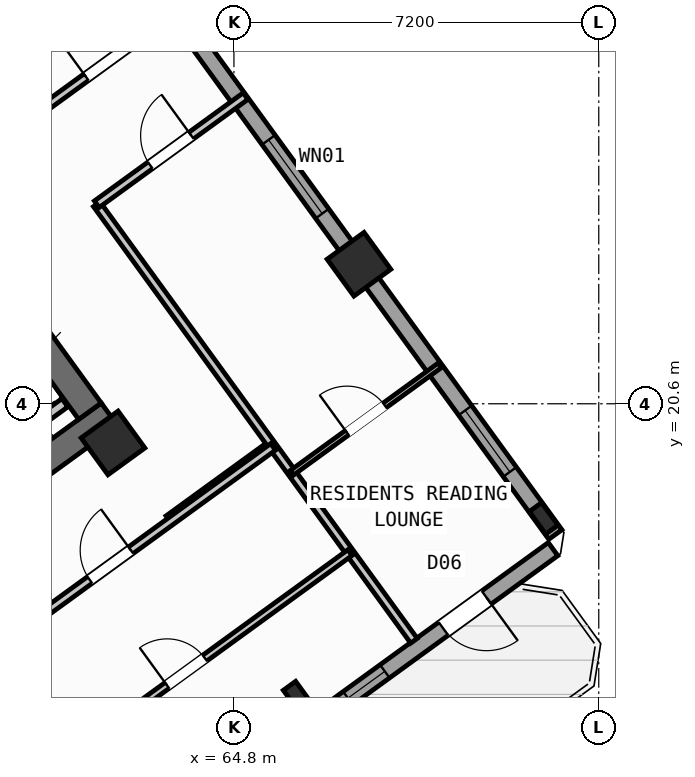
"""IFC4 building model, lengths in metres.
Left out: names, types, materials, properties, quantities, classifications, styles, units other than length and angle.
Written with IfcOpenShell. Run it as: python <this file> out.ifc"""

import sys

from ifc_helpers import new_model, si_unit, direction, frame, frame_2d, origin, origin_2d, place, context, subcontext, project, spatial, rectangle, hollow_rectangle, i_section, extrude, source, transform, mapped, element, fill, save


model = new_model("IFC4")
c1 = context("Model", 3, precision=1e-05, world=origin(), true_north=direction((0.0, 1.0)))
c2 = subcontext(c1, "Body", "Model", "MODEL_VIEW")
j1 = project(units=[si_unit("LENGTHUNIT", "METRE"), si_unit("PLANEANGLEUNIT", "RADIAN")], contexts=[c1])
p1 = place(None, origin())
s1 = spatial("IfcSite", under=j1, at=p1, CompositionType="ELEMENT")
p2 = place(p1, origin())
s2 = spatial("IfcBuilding", under=s1, at=p2, CompositionType="ELEMENT")
p3 = place(p2, frame((0.0, 0.0, 144.3)))
s3 = spatial("IfcBuildingStorey", under=s2, at=p3, CompositionType="ELEMENT", Elevation=144.3)
p4 = place(p3, frame((52.359, 13.14, 0.0), z_axis=(0.0, 0.0, 1.0), x_axis=(0.809014896919, 0.587788139183, 0.0)))
e1 = element("IfcWall", 1, at=p4, inside=s3, PredefinedType="SHEAR", context=c2, shape_type="SweptSolid", body=[
    extrude(rectangle(XDim=12.34, YDim=0.55, at=frame_2d((6.17, 0.0))), origin(), (0.0, 0.0, 1.0), 3.35),
])
p5 = place(p3, frame((61.958, 20.454, 0.0), z_axis=(0.0, 0.0, 1.0), x_axis=(-0.587802113096, 0.809004744015, 0.0)))
e2 = element("IfcWall", 2, at=p5, inside=s3, PredefinedType="SHEAR", context=c2, shape_type="SweptSolid", body=[
    extrude(rectangle(XDim=3.575, YDim=0.55, at=frame_2d((1.788, 0.0))), origin(), (0.0, 0.0, 1.0), 3.35),
])
m1 = source(origin(), c2, "Body", "SweptSolid", [
    extrude(i_section(OverallWidth=0.3, OverallDepth=0.55, WebThickness=0.015, FlangeThickness=0.029, at=origin_2d()), origin(), (0.0, 0.0, 1.0), 3.6),
])
p6 = place(p3, frame((66.058, 14.811, 0.0), z_axis=(0.0, 0.0, 1.0), x_axis=(0.809016994375, 0.587785252292, 0.0)))
e3 = element("IfcColumn", 3, at=p6, inside=s3, PredefinedType="COLUMN", context=c2, shape_type="MappedRepresentation", body=[
    mapped(m1, transform((0.0, 0.0, 0.0), scale=1.0)),
])
m2 = source(origin(), c2, "Body", "SweptSolid", [
    extrude(hollow_rectangle(XDim=0.9, YDim=0.9, WallThickness=0.036, at=origin_2d()), origin(), (0.0, 0.0, 1.0), 3.6),
])
p7 = place(p3, frame((62.414, 19.827, 0.0), z_axis=(0.0, 0.0, 1.0), x_axis=(0.809016994375, 0.587785252292, 0.0)))
e4 = element("IfcColumn", 4, at=p7, inside=s3, PredefinedType="COLUMN", context=c2, shape_type="MappedRepresentation", body=[
    mapped(m2, transform((0.0, 0.0, 0.0), scale=1.0)),
])
p8 = place(p3, frame((70.912, 18.338, 0.0), z_axis=(0.0, 0.0, 1.0), x_axis=(0.809016994375, 0.587785252292, 0.0)))
e5 = element("IfcColumn", 5, at=p8, inside=s3, PredefinedType="COLUMN", context=c2, shape_type="MappedRepresentation", body=[
    mapped(m1, transform((0.0, 0.0, 0.0), scale=1.0)),
])
p9 = place(p3, frame((67.268, 23.354, 0.0), z_axis=(0.0, 0.0, 1.0), x_axis=(0.809016994375, 0.587785252292, 0.0)))
e6 = element("IfcColumn", 6, at=p9, inside=s3, PredefinedType="COLUMN", context=c2, shape_type="MappedRepresentation", body=[
    mapped(m2, transform((0.0, 0.0, 0.0), scale=1.0)),
])
p10 = place(p3, frame((58.455, 35.484, 0.0), z_axis=(0.0, 0.0, 1.0), x_axis=(0.587783625747, -0.809018176127, 0.0)))
e7 = element("IfcWall", 7, at=p10, inside=s3, PredefinedType="STANDARD", context=c2, shape_type="SweptSolid", body=[
    extrude(rectangle(XDim=21.587, YDim=0.32, at=frame_2d((10.794, 0.0))), origin(), (0.0, 0.0, 1.0), 2.775),
])
p11 = place(p10, frame((2.994, 0.0, 0.8)))
e8 = element("IfcOpeningElement", 8, at=p11, cuts=e7, PredefinedType="OPENING", context=c2, shape_type="SweptSolid", body=[
    extrude(rectangle(XDim=2.1, YDim=1.55, at=frame_2d((1.05, 0.775))), frame((0.0, 0.17, 0.0), z_axis=(0.0, -1.0, 0.0), x_axis=(1.0, 0.0, 0.0)), (0.0, 0.0, 1.0), 0.34),
])
p12 = place(p10, frame((11.959, 0.0, 0.85)))
e9 = element("IfcOpeningElement", 9, at=p12, cuts=e7, PredefinedType="OPENING", context=c2, shape_type="SweptSolid", body=[
    extrude(rectangle(XDim=1.8, YDim=1.5, at=frame_2d((0.9, 0.75))), frame((0.0, 0.17, 0.0), z_axis=(0.0, -1.0, 0.0), x_axis=(1.0, 0.0, 0.0)), (0.0, 0.0, 1.0), 0.34),
])
p13 = place(p10, frame((18.56, 0.0, 0.85)))
e10 = element("IfcOpeningElement", 10, at=p13, cuts=e7, PredefinedType="OPENING", context=c2, shape_type="SweptSolid", body=[
    extrude(rectangle(XDim=1.5, YDim=1.5, at=frame_2d((0.75, 0.75))), frame((0.0, 0.17, 0.0), z_axis=(0.0, -1.0, 0.0), x_axis=(1.0, 0.0, 0.0)), (0.0, 0.0, 1.0), 0.34),
])
p14 = place(p3, frame((71.098, 17.731, 0.0), z_axis=(0.0, 0.0, 1.0), x_axis=(-0.809021120468, -0.587779573171, 0.0)))
e11 = element("IfcWall", 11, at=p14, inside=s3, PredefinedType="STANDARD", context=c2, shape_type="SweptSolid", body=[
    extrude(rectangle(XDim=17.588, YDim=0.32, at=frame_2d((8.794, 0.0))), origin(), (0.0, 0.0, 1.0), 3.35),
])
p15 = place(p14, frame((1.624, 0.0, 0.0)))
e12 = element("IfcOpeningElement", 12, at=p15, cuts=e11, PredefinedType="OPENING", context=c2, shape_type="SweptSolid", body=[
    extrude(rectangle(XDim=1.05, YDim=2.15, at=frame_2d((0.525, 1.075))), frame((0.0, 0.17, 0.0), z_axis=(0.0, -1.0, 0.0), x_axis=(1.0, 0.0, 0.0)), (0.0, 0.0, 1.0), 0.34),
])
p16 = place(p14, frame((4.104, 0.0, 1.0)))
e13 = element("IfcOpeningElement", 13, at=p16, cuts=e11, PredefinedType="OPENING", context=c2, shape_type="SweptSolid", body=[
    extrude(rectangle(XDim=0.9, YDim=1.25, at=frame_2d((0.45, 0.625))), frame((0.0, 0.17, 0.0), z_axis=(0.0, -1.0, 0.0), x_axis=(1.0, 0.0, 0.0)), (0.0, 0.0, 1.0), 0.34),
])
p17 = place(p14, frame((7.879, 0.0, 0.85)))
e14 = element("IfcOpeningElement", 14, at=p17, cuts=e11, PredefinedType="OPENING", context=c2, shape_type="SweptSolid", body=[
    extrude(rectangle(XDim=1.8, YDim=1.5, at=frame_2d((0.9, 0.75))), frame((0.0, 0.17, 0.0), z_axis=(0.0, -1.0, 0.0), x_axis=(1.0, 0.0, 0.0)), (0.0, 0.0, 1.0), 0.34),
])
p18 = place(p14, frame((12.849, 0.0, 0.85)))
e15 = element("IfcOpeningElement", 15, at=p18, cuts=e11, PredefinedType="OPENING", context=c2, shape_type="SweptSolid", body=[
    extrude(rectangle(XDim=1.8, YDim=1.5, at=frame_2d((0.9, 0.75))), frame((0.0, 0.17, 0.0), z_axis=(0.0, -1.0, 0.0), x_axis=(1.0, 0.0, 0.0)), (0.0, 0.0, 1.0), 0.34),
])
p19 = place(p3, frame((58.472, 18.447, 0.0), z_axis=(0.0, 0.0, 1.0), x_axis=(0.809018631237, 0.587782999339, 0.0)))
e16 = element("IfcWall", 16, at=p19, inside=s3, PredefinedType="STANDARD", context=c2, shape_type="SweptSolid", body=[
    extrude(rectangle(XDim=3.698, YDim=0.2, at=frame_2d((1.849, 0.0))), origin(), (0.0, 0.0, 1.0), 3.34),
])
p20 = place(p3, frame((63.507, 18.322, 0.0), z_axis=(0.0, 0.0, 1.0), x_axis=(0.809034604122, 0.587761013791, 0.0)))
e17 = element("IfcWall", 17, at=p20, inside=s3, PredefinedType="PARTITIONING", context=c2, shape_type="SweptSolid", body=[
    extrude(rectangle(XDim=2.51, YDim=0.16, at=frame_2d((1.255, 0.0))), origin(), (0.0, 0.0, 1.0), 3.34),
])
p21 = place(p3, frame((68.353, 15.922, 0.0), z_axis=(0.0, 0.0, 1.0), x_axis=(-0.587783168305, 0.809018508476, 0.0)))
e18 = element("IfcWall", 18, at=p21, inside=s3, PredefinedType="PARTITIONING", context=c2, shape_type="SweptSolid", body=[
    extrude(rectangle(XDim=10.65, YDim=0.16, at=frame_2d((5.325, 0.0))), origin(), (0.0, 0.0, 1.0), 3.34),
])
p22 = place(p3, frame((62.093, 24.538, 0.0), z_axis=(0.0, 0.0, 1.0), x_axis=(0.809035546126, 0.58775971715, 0.0)))
e19 = element("IfcWall", 19, at=p22, inside=s3, PredefinedType="PARTITIONING", context=c2, shape_type="SweptSolid", body=[
    extrude(rectangle(XDim=3.63, YDim=0.16, at=frame_2d((1.815, 0.0))), origin(), (0.0, 0.0, 1.0), 3.34),
])
p23 = place(p22, frame((1.305, 0.0, 0.0)))
e20 = element("IfcOpeningElement", 20, at=p23, cuts=e19, PredefinedType="OPENING", context=c2, shape_type="SweptSolid", body=[
    extrude(rectangle(XDim=1.0, YDim=2.1, at=frame_2d((0.5, 1.05))), frame((0.0, 0.09, 0.0), z_axis=(0.0, -1.0, 0.0), x_axis=(1.0, 0.0, 0.0)), (0.0, 0.0, 1.0), 0.18),
])
p24 = place(p3, frame((60.829, 26.278, 0.0), z_axis=(0.0, 0.0, 1.0), x_axis=(0.809003564202, 0.587803736896, 0.0)))
e21 = element("IfcWall", 21, at=p24, inside=s3, PredefinedType="PARTITIONING", context=c2, shape_type="SweptSolid", body=[
    extrude(rectangle(XDim=3.63, YDim=0.16, at=frame_2d((1.815, 0.0))), origin(), (0.0, 0.0, 1.0), 3.34),
])
p25 = place(p24, frame((1.305, 0.0, 0.0)))
e22 = element("IfcOpeningElement", 22, at=p25, cuts=e21, PredefinedType="OPENING", context=c2, shape_type="SweptSolid", body=[
    extrude(rectangle(XDim=1.0, YDim=2.1, at=frame_2d((0.5, 1.05))), frame((0.0, 0.09, 0.0), z_axis=(0.0, -1.0, 0.0), x_axis=(1.0, 0.0, 0.0)), (0.0, 0.0, 1.0), 0.18),
])
p26 = place(p3, frame((65.944, 19.238, 0.0), z_axis=(0.0, 0.0, 1.0), x_axis=(0.809013833588, 0.587789602718, 0.0)))
e23 = element("IfcWall", 23, at=p26, inside=s3, PredefinedType="PARTITIONING", context=c2, shape_type="SweptSolid", body=[
    extrude(rectangle(XDim=3.61, YDim=0.11, at=frame_2d((1.805, 0.0))), origin(), (0.0, 0.0, 1.0), 3.34),
])
p27 = place(p26, frame((1.345, 0.0, 0.0)))
e24 = element("IfcOpeningElement", 24, at=p27, cuts=e23, PredefinedType="OPENING", context=c2, shape_type="SweptSolid", body=[
    extrude(rectangle(XDim=0.92, YDim=2.08, at=frame_2d((0.46, 1.04))), frame((0.0, 0.065, 0.0), z_axis=(0.0, -1.0, 0.0), x_axis=(1.0, 0.0, 0.0)), (0.0, 0.0, 1.0), 0.13),
])
p28 = place(p3, frame((53.705, 11.126, 0.0), z_axis=(0.0, 0.0, 1.0), x_axis=(0.809014504436, 0.587788679384, 0.0)))
e25 = element("IfcWall", 25, at=p28, inside=s3, PredefinedType="PARTITIONING", context=c2, shape_type="SweptSolid", body=[
    extrude(rectangle(XDim=14.67, YDim=0.16, at=frame_2d((7.335, 0.0))), origin(), (0.0, 0.0, 1.0), 3.34),
])
p29 = place(p28, frame((10.2, 0.0, 0.0)))
e26 = element("IfcOpeningElement", 26, at=p29, cuts=e25, PredefinedType="OPENING", context=c2, shape_type="SweptSolid", body=[
    extrude(rectangle(XDim=1.0, YDim=2.1, at=frame_2d((0.5, 1.05))), frame((0.0, 0.09, 0.0), z_axis=(0.0, -1.0, 0.0), x_axis=(1.0, 0.0, 0.0)), (0.0, 0.0, 1.0), 0.18),
])
p30 = place(p3, frame((56.249, 9.785, 0.0), z_axis=(0.0, 0.0, 1.0), x_axis=(0.809011747655, 0.587792473715, 0.0)))
e27 = element("IfcWall", 27, at=p30, inside=s3, PredefinedType="PLUMBINGWALL", context=c2, shape_type="SweptSolid", body=[
    extrude(rectangle(XDim=13.4, YDim=0.14, at=frame_2d((6.7, 0.0))), origin(), (0.0, 0.0, 1.0), 3.34),
])
p31 = place(p30, frame((8.94, 0.0, 0.0)))
e28 = element("IfcOpeningElement", 28, at=p31, cuts=e27, PredefinedType="OPENING", context=c2, shape_type="SweptSolid", body=[
    extrude(rectangle(XDim=0.92, YDim=2.08, at=frame_2d((0.46, 1.04))), frame((0.0, 0.08, 0.0), z_axis=(0.0, -1.0, 0.0), x_axis=(1.0, 0.0, 0.0)), (0.0, 0.0, 1.0), 0.16),
])
m3 = source(origin(), c2, "Body", "SweptSolid", [
    extrude(rectangle(XDim=1.05, YDim=2.15, at=frame_2d((0.525, 1.075))), frame((0.0, 0.025, 0.0), z_axis=(0.0, -1.0, 0.0), x_axis=(1.0, 0.0, 0.0)), (0.0, 0.0, 1.0), 0.05),
])
p32 = place(p15, origin())
e29 = element("IfcDoor", 29, at=p32, inside=s3, OperationType="SINGLE_SWING_LEFT", PredefinedType="DOOR", context=c2, shape_type="MappedRepresentation", body=[
    mapped(m3, transform((0.0, 0.0, 0.0), scale=1.0)),
])
fill(e12, e29)
m4 = source(origin(), c2, "Body", "SweptSolid", [
    extrude(rectangle(XDim=1.8, YDim=1.5, at=frame_2d((0.9, 0.75))), frame((0.0, 0.03, 0.0), z_axis=(0.0, -1.0, 0.0), x_axis=(1.0, 0.0, 0.0)), (0.0, 0.0, 1.0), 0.06),
])
p33 = place(p12, origin())
e30 = element("IfcWindow", 30, at=p33, inside=s3, PartitioningType="SINGLE_PANEL", PredefinedType="WINDOW", context=c2, shape_type="MappedRepresentation", body=[
    mapped(m4, transform((0.0, 0.0, 0.0), scale=1.0)),
])
fill(e9, e30)
m5 = source(origin(), c2, "Body", "SweptSolid", [
    extrude(rectangle(XDim=1.5, YDim=1.5, at=frame_2d((0.75, 0.75))), frame((0.0, 0.03, 0.0), z_axis=(0.0, -1.0, 0.0), x_axis=(1.0, 0.0, 0.0)), (0.0, 0.0, 1.0), 0.06),
])
p34 = place(p13, origin())
e31 = element("IfcWindow", 31, at=p34, inside=s3, PartitioningType="SINGLE_PANEL", PredefinedType="WINDOW", context=c2, shape_type="MappedRepresentation", body=[
    mapped(m5, transform((0.0, 0.0, 0.0), scale=1.0)),
])
fill(e10, e31)
m6 = source(origin(), c2, "Body", "SweptSolid", [
    extrude(rectangle(XDim=0.9, YDim=1.25, at=frame_2d((0.45, 0.625))), frame((0.0, 0.03, 0.0), z_axis=(0.0, -1.0, 0.0), x_axis=(1.0, 0.0, 0.0)), (0.0, 0.0, 1.0), 0.06),
])
p35 = place(p16, origin())
e32 = element("IfcWindow", 32, at=p35, inside=s3, PartitioningType="SINGLE_PANEL", PredefinedType="WINDOW", context=c2, shape_type="MappedRepresentation", body=[
    mapped(m6, transform((0.0, 0.0, 0.0), scale=1.0)),
])
fill(e13, e32)
m7 = source(origin(), c2, "Body", "SweptSolid", [
    extrude(rectangle(XDim=1.0, YDim=2.1, at=frame_2d((0.5, 1.05))), frame((0.0, 0.025, 0.0), z_axis=(0.0, -1.0, 0.0), x_axis=(1.0, 0.0, 0.0)), (0.0, 0.0, 1.0), 0.05),
])
p36 = place(p25, origin())
e33 = element("IfcDoor", 33, at=p36, inside=s3, OperationType="SINGLE_SWING_LEFT", PredefinedType="DOOR", context=c2, shape_type="MappedRepresentation", body=[
    mapped(m7, transform((0.0, 0.0, 0.0), scale=1.0)),
])
fill(e22, e33)
p37 = place(p23, origin())
e34 = element("IfcDoor", 34, at=p37, inside=s3, OperationType="SINGLE_SWING_RIGHT", PredefinedType="DOOR", context=c2, shape_type="MappedRepresentation", body=[
    mapped(m7, transform((0.0, 0.0, 0.0), scale=1.0)),
])
fill(e20, e34)
m8 = source(origin(), c2, "Body", "SweptSolid", [
    extrude(rectangle(XDim=0.92, YDim=2.08, at=frame_2d((0.46, 1.04))), frame((0.0, 0.025, 0.0), z_axis=(0.0, -1.0, 0.0), x_axis=(1.0, 0.0, 0.0)), (0.0, 0.0, 1.0), 0.05),
])
p38 = place(p27, origin())
e35 = element("IfcDoor", 35, at=p38, inside=s3, OperationType="SINGLE_SWING_LEFT", PredefinedType="DOOR", context=c2, shape_type="MappedRepresentation", body=[
    mapped(m8, transform((0.0, 0.0, 0.0), scale=1.0)),
])
fill(e24, e35)
p39 = place(p29, origin())
e36 = element("IfcDoor", 36, at=p39, inside=s3, OperationType="SINGLE_SWING_RIGHT", PredefinedType="DOOR", context=c2, shape_type="MappedRepresentation", body=[
    mapped(m7, transform((0.0, 0.0, 0.0), scale=1.0)),
])
fill(e26, e36)
p40 = place(p31, origin())
e37 = element("IfcDoor", 37, at=p40, inside=s3, OperationType="SINGLE_SWING_LEFT", PredefinedType="DOOR", context=c2, shape_type="MappedRepresentation", body=[
    mapped(m8, transform((0.0, 0.0, 0.0), scale=1.0)),
])
fill(e28, e37)
save(model, sys.argv[1])
